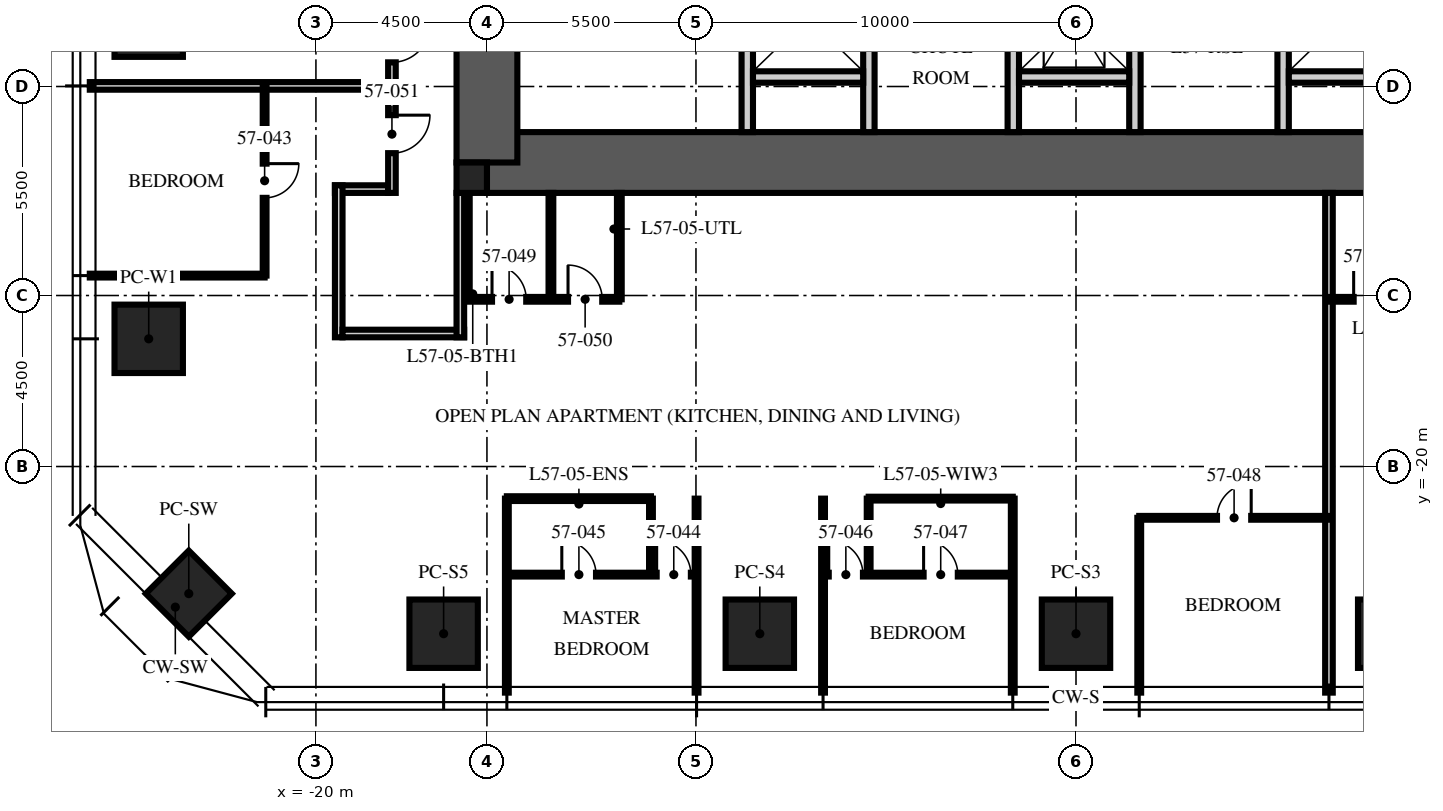
"""IFC4 building model, lengths in metres.
Left out: names, types, materials, properties, quantities, classifications, styles, units other than length and angle.
Written with IfcOpenShell. Run it as: python <this file> out.ifc"""

import sys

from ifc_helpers import new_model, si_unit, direction, frame, frame_2d, origin, origin_2d, place, context, subcontext, project, spatial, rectangle, extrude, element, fill, save


model = new_model("IFC4")
c1 = context("Model", 3, precision=1e-05, world=origin(), true_north=direction((0.0, 1.0)))
c2 = subcontext(c1, "Body", "Model", "MODEL_VIEW")
j1 = project(units=[si_unit("LENGTHUNIT", "METRE"), si_unit("PLANEANGLEUNIT", "RADIAN")], contexts=[c1])
p1 = place(None, origin())
s1 = spatial("IfcSite", under=j1, at=p1, CompositionType="ELEMENT")
p2 = place(p1, origin())
s2 = spatial("IfcBuilding", under=s1, at=p2, CompositionType="ELEMENT")
p3 = place(p2, frame((0.0, 0.0, 229.5)))
s3 = spatial("IfcBuildingStorey", under=s2, at=p3, CompositionType="ELEMENT", Elevation=229.5)
p4 = place(p3, frame((-15.5, -12.0, -0.25), z_axis=(0.0, 0.0, 1.0), x_axis=(1.0, 0.0, 0.0)))
e1 = element("IfcWall", 1, at=p4, inside=s3, PredefinedType="SHEAR", context=c2, shape_type="SweptSolid", body=[
    extrude(rectangle(XDim=31.0, YDim=1.6, at=frame_2d((15.5, 0.0))), origin(), (0.0, 0.0, 1.0), 3.75),
])
p5 = place(p3, frame((-15.5, -12.0, -0.25), z_axis=(0.0, 0.0, 1.0), x_axis=(0.0, 1.0, 0.0)))
e2 = element("IfcWall", 2, at=p5, inside=s3, PredefinedType="SHEAR", context=c2, shape_type="SweptSolid", body=[
    extrude(rectangle(XDim=24.0, YDim=1.6, at=frame_2d((12.0, 0.0))), origin(), (0.0, 0.0, 1.0), 3.75),
])
p6 = place(p5, frame((3.2, 0.0, 0.25)))
e3 = element("IfcOpeningElement", 3, at=p6, cuts=e2, PredefinedType="OPENING", context=c2, shape_type="SweptSolid", body=[
    extrude(rectangle(XDim=1.2, YDim=2.1, at=frame_2d((0.6, 1.05))), frame((0.0, 0.81, 0.0), z_axis=(0.0, -1.0, 0.0), x_axis=(1.0, 0.0, 0.0)), (0.0, 0.0, 1.0), 1.62),
])
p7 = place(p5, frame((19.3, 0.0, 0.25)))
e4 = element("IfcOpeningElement", 4, at=p7, cuts=e2, PredefinedType="OPENING", context=c2, shape_type="SweptSolid", body=[
    extrude(rectangle(XDim=1.8, YDim=2.1, at=frame_2d((0.9, 1.05))), frame((0.0, 0.81, 0.0), z_axis=(0.0, -1.0, 0.0), x_axis=(1.0, 0.0, 0.0)), (0.0, 0.0, 1.0), 1.62),
])
p8 = place(p3, frame((-15.9, -12.4, -0.25), z_axis=(0.0, 0.0, 1.0), x_axis=(1.0, 0.0, 0.0)))
e5 = element("IfcColumn", 5, at=p8, inside=s3, PredefinedType="COLUMN", context=c2, shape_type="SweptSolid", body=[
    extrude(rectangle(XDim=0.8, YDim=0.8, at=origin_2d()), origin(), (0.0, 0.0, 1.0), 3.75),
])
for number, where, z_axis, x_axis in (
    (6, (8.32, -24.4, 0.0), (0.0, 0.0, 1.0), (1.0, 0.0, 0.0)),
    (7, (0.0, -24.4, 0.0), (0.0, 0.0, 1.0), (1.0, 0.0, 0.0)),
    (8, (-8.32, -24.4, 0.0), (0.0, 0.0, 1.0), (1.0, 0.0, 0.0)),
    (9, (-16.64, -24.4, 0.0), (0.0, 0.0, 1.0), (1.0, 0.0, 0.0)),
    (10, (-24.4, -16.64, 0.0), (0.0, 0.0, 1.0), (0.0, 1.0, 0.0)),
    (11, (-24.4, -8.32, 0.0), (0.0, 0.0, 1.0), (0.0, 1.0, 0.0)),
):
    element("IfcColumn", number, at=place(p3, frame(where, z_axis=z_axis, x_axis=x_axis)), inside=s3, PredefinedType="COLUMN", context=c2, shape_type="SweptSolid", body=[
        extrude(rectangle(XDim=1.8, YDim=1.8, at=origin_2d()), origin(), (0.0, 0.0, 1.0), 3.75),
    ])
p9 = place(p3, frame((-23.346, -23.346, 0.0), z_axis=(0.0, 0.0, 1.0), x_axis=(0.707106781187, -0.707106781187, 0.0)))
e12 = element("IfcColumn", 12, at=p9, inside=s3, PredefinedType="COLUMN", context=c2, shape_type="SweptSolid", body=[
    extrude(rectangle(XDim=1.6, YDim=1.6, at=origin_2d()), origin(), (0.0, 0.0, 1.0), 3.75),
])
p10 = place(p3, frame((-8.65, -11.2, 0.0), z_axis=(0.0, 0.0, 1.0), x_axis=(0.0, 1.0, 0.0)))
e13 = element("IfcWall", 13, at=p10, inside=s3, PredefinedType="PARTITIONING", context=c2, shape_type="SweptSolid", body=[
    extrude(rectangle(XDim=6.3, YDim=0.3, at=frame_2d((3.15, 0.0))), origin(), (0.0, 0.0, 1.0), 3.5),
])
p11 = place(p10, frame((2.45, 0.0, 0.0)))
e14 = element("IfcOpeningElement", 14, at=p11, cuts=e13, PredefinedType="OPENING", context=c2, shape_type="SweptSolid", body=[
    extrude(rectangle(XDim=1.1, YDim=2.1, at=frame_2d((0.55, 1.05))), frame((0.0, 0.16, 0.0), z_axis=(0.0, -1.0, 0.0), x_axis=(1.0, 0.0, 0.0)), (0.0, 0.0, 1.0), 0.32),
])
for number, where, z_axis, x_axis in (
    (15, (-5.45, -11.2, 0.0), (0.0, 0.0, 1.0), (0.0, 1.0, 0.0)),
    (16, (-1.65, -11.2, 0.0), (0.0, 0.0, 1.0), (0.0, 1.0, 0.0)),
    (17, (1.55, -11.2, 0.0), (0.0, 0.0, 1.0), (0.0, 1.0, 0.0)),
    (18, (5.45, -11.2, 0.0), (0.0, 0.0, 1.0), (0.0, 1.0, 0.0)),
):
    element("IfcWall", number, at=place(p3, frame(where, z_axis=z_axis, x_axis=x_axis)), inside=s3, PredefinedType="PARTITIONING", context=c2, shape_type="SweptSolid", body=[
        extrude(rectangle(XDim=4.4, YDim=0.3, at=frame_2d((2.2, 0.0))), origin(), (0.0, 0.0, 1.0), 3.5),
    ])
for number, where, z_axis, x_axis in (
    (19, (-8.5, -9.75, 0.0), (0.0, 0.0, 1.0), (1.0, 0.0, 0.0)),
    (20, (-1.5, -9.75, 0.0), (0.0, 0.0, 1.0), (1.0, 0.0, 0.0)),
    (21, (5.6, -9.75, 0.0), (0.0, 0.0, 1.0), (1.0, 0.0, 0.0)),
):
    element("IfcWall", number, at=place(p3, frame(where, z_axis=z_axis, x_axis=x_axis)), inside=s3, PredefinedType="PARTITIONING", context=c2, shape_type="SweptSolid", body=[
        extrude(rectangle(XDim=2.9, YDim=0.3, at=frame_2d((1.45, 0.0))), origin(), (0.0, 0.0, 1.0), 3.5),
    ])
p12 = place(p3, frame((-18.1, -12.7, 0.0), z_axis=(0.0, 0.0, 1.0), x_axis=(-1.0, 0.0, 0.0)))
e22 = element("IfcWall", 22, at=p12, inside=s3, PredefinedType="PARTITIONING", context=c2, shape_type="SweptSolid", body=[
    extrude(rectangle(XDim=1.4, YDim=0.2, at=frame_2d((0.7, 0.0))), origin(), (0.0, 0.0, 1.0), 2.81),
])
p13 = place(p3, frame((-19.4, -12.6, 0.0), z_axis=(0.0, 0.0, 1.0), x_axis=(0.0, -1.0, 0.0)))
e23 = element("IfcWall", 23, at=p13, inside=s3, PredefinedType="PARTITIONING", context=c2, shape_type="SweptSolid", body=[
    extrude(rectangle(XDim=4.0, YDim=0.2, at=frame_2d((2.0, 0.0))), origin(), (0.0, 0.0, 1.0), 2.6),
])
p14 = place(p3, frame((-19.3, -16.5, 0.0), z_axis=(0.0, 0.0, 1.0), x_axis=(1.0, 0.0, 0.0)))
e24 = element("IfcWall", 24, at=p14, inside=s3, PredefinedType="PARTITIONING", context=c2, shape_type="SweptSolid", body=[
    extrude(rectangle(XDim=3.2, YDim=0.2, at=frame_2d((1.6, 0.0))), origin(), (0.0, 0.0, 1.0), 2.3),
])
p15 = place(p3, frame((-16.2, -16.6, 0.0), z_axis=(0.0, 0.0, 1.0), x_axis=(0.0, 1.0, 0.0)))
e25 = element("IfcWall", 25, at=p15, inside=s3, PredefinedType="PARTITIONING", context=c2, shape_type="SweptSolid", body=[
    extrude(rectangle(XDim=3.8, YDim=0.2, at=frame_2d((1.9, 0.0))), origin(), (0.0, 0.0, 1.0), 2.3),
])
p16 = place(p3, frame((-18.1, -9.984, 0.0), z_axis=(0.0, 0.0, 1.0), x_axis=(-1.0, 0.0, 0.0)))
e26 = element("IfcWall", 26, at=p16, inside=s3, PredefinedType="PARTITIONING", context=c2, shape_type="SweptSolid", body=[
    extrude(rectangle(XDim=7.85, YDim=0.2, at=frame_2d((3.925, 0.0))), origin(), (0.0, 0.0, 1.0), 2.91),
])
p17 = place(p3, frame((-21.35, -14.976, 0.0), z_axis=(0.0, 0.0, 1.0), x_axis=(-1.0, 0.0, 0.0)))
e27 = element("IfcWall", 27, at=p17, inside=s3, PredefinedType="PARTITIONING", context=c2, shape_type="SweptSolid", body=[
    extrude(rectangle(XDim=4.6, YDim=0.1, at=frame_2d((2.3, 0.0))), origin(), (0.0, 0.0, 1.0), 2.91),
])
for number, where, z_axis, x_axis in (
    (28, (-14.976, -20.845, 0.0), (0.0, 0.0, 1.0), (0.0, -1.0, 0.0)),
    (29, (-9.984, -20.845, 0.0), (0.0, 0.0, 1.0), (0.0, -1.0, 0.0)),
    (30, (-6.656, -20.845, 0.0), (0.0, 0.0, 1.0), (0.0, -1.0, 0.0)),
    (31, (-1.664, -20.845, 0.0), (0.0, 0.0, 1.0), (0.0, -1.0, 0.0)),
):
    element("IfcWall", number, at=place(p3, frame(where, z_axis=z_axis, x_axis=x_axis)), inside=s3, PredefinedType="PARTITIONING", context=c2, shape_type="SweptSolid", body=[
        extrude(rectangle(XDim=5.105, YDim=0.1, at=frame_2d((2.552, 0.0))), origin(), (0.0, 0.0, 1.0), 2.91),
    ])
p18 = place(p3, frame((1.664, -21.35, 0.0), z_axis=(0.0, 0.0, 1.0), x_axis=(0.0, -1.0, 0.0)))
e32 = element("IfcWall", 32, at=p18, inside=s3, PredefinedType="PARTITIONING", context=c2, shape_type="SweptSolid", body=[
    extrude(rectangle(XDim=4.6, YDim=0.1, at=frame_2d((2.3, 0.0))), origin(), (0.0, 0.0, 1.0), 2.91),
])
p19 = place(p3, frame((6.656, -12.8, 0.0), z_axis=(0.0, 0.0, 1.0), x_axis=(0.0, -1.0, 0.0)))
e33 = element("IfcWall", 33, at=p19, inside=s3, PredefinedType="PARTITIONING", context=c2, shape_type="SweptSolid", body=[
    extrude(rectangle(XDim=13.15, YDim=0.2, at=frame_2d((6.575, 0.0))), origin(), (0.0, 0.0, 1.0), 2.91),
])
p20 = place(p3, frame((-21.35, -9.984, 0.0), z_axis=(0.0, 0.0, 1.0), x_axis=(0.0, -1.0, 0.0)))
e34 = element("IfcWall", 34, at=p20, inside=s3, PredefinedType="PARTITIONING", context=c2, shape_type="SweptSolid", body=[
    extrude(rectangle(XDim=4.992, YDim=0.1, at=frame_2d((2.496, 0.0))), origin(), (0.0, 0.0, 1.0), 2.81),
])
p21 = place(p20, frame((2.046, 0.0, 0.0)))
e35 = element("IfcOpeningElement", 35, at=p21, cuts=e34, PredefinedType="OPENING", context=c2, shape_type="SweptSolid", body=[
    extrude(rectangle(XDim=0.9, YDim=2.1, at=frame_2d((0.45, 1.05))), frame((0.0, 0.06, 0.0), z_axis=(0.0, -1.0, 0.0), x_axis=(1.0, 0.0, 0.0)), (0.0, 0.0, 1.0), 0.12),
])
p22 = place(p3, frame((-14.976, -22.845, 0.0), z_axis=(0.0, 0.0, 1.0), x_axis=(1.0, 0.0, 0.0)))
e36 = element("IfcWall", 36, at=p22, inside=s3, PredefinedType="PARTITIONING", context=c2, shape_type="SweptSolid", body=[
    extrude(rectangle(XDim=4.992, YDim=0.1, at=frame_2d((2.496, 0.0))), origin(), (0.0, 0.0, 1.0), 2.81),
])
p23 = place(p22, frame((3.942, 0.0, 0.0)))
e37 = element("IfcOpeningElement", 37, at=p23, cuts=e36, PredefinedType="OPENING", context=c2, shape_type="SweptSolid", body=[
    extrude(rectangle(XDim=0.9, YDim=2.1, at=frame_2d((0.45, 1.05))), frame((0.0, 0.06, 0.0), z_axis=(0.0, -1.0, 0.0), x_axis=(1.0, 0.0, 0.0)), (0.0, 0.0, 1.0), 0.12),
])
p24 = place(p22, frame((1.446, 0.0, 0.0)))
e38 = element("IfcOpeningElement", 38, at=p24, cuts=e36, PredefinedType="OPENING", context=c2, shape_type="SweptSolid", body=[
    extrude(rectangle(XDim=0.9, YDim=2.1, at=frame_2d((0.45, 1.05))), frame((0.0, 0.06, 0.0), z_axis=(0.0, -1.0, 0.0), x_axis=(1.0, 0.0, 0.0)), (0.0, 0.0, 1.0), 0.12),
])
p25 = place(p3, frame((-11.184, -20.845, 0.0), z_axis=(0.0, 0.0, 1.0), x_axis=(0.0, -1.0, 0.0)))
e39 = element("IfcWall", 39, at=p25, inside=s3, PredefinedType="PARTITIONING", context=c2, shape_type="SweptSolid", body=[
    extrude(rectangle(XDim=2.0, YDim=0.1, at=frame_2d((1.0, 0.0))), origin(), (0.0, 0.0, 1.0), 3.5),
])
p26 = place(p3, frame((-14.976, -20.845, 0.0), z_axis=(0.0, 0.0, 1.0), x_axis=(1.0, 0.0, 0.0)))
e40 = element("IfcWall", 40, at=p26, inside=s3, PredefinedType="PARTITIONING", context=c2, shape_type="SweptSolid", body=[
    extrude(rectangle(XDim=3.792, YDim=0.125, at=frame_2d((1.896, 0.0))), origin(), (0.0, 0.0, 1.0), 2.81),
])
p27 = place(p3, frame((-6.656, -22.845, 0.0), z_axis=(0.0, 0.0, 1.0), x_axis=(1.0, 0.0, 0.0)))
e41 = element("IfcWall", 41, at=p27, inside=s3, PredefinedType="PARTITIONING", context=c2, shape_type="SweptSolid", body=[
    extrude(rectangle(XDim=4.992, YDim=0.1, at=frame_2d((2.496, 0.0))), origin(), (0.0, 0.0, 1.0), 2.81),
])
p28 = place(p27, frame((0.15, 0.0, 0.0)))
e42 = element("IfcOpeningElement", 42, at=p28, cuts=e41, PredefinedType="OPENING", context=c2, shape_type="SweptSolid", body=[
    extrude(rectangle(XDim=0.9, YDim=2.1, at=frame_2d((0.45, 1.05))), frame((0.0, 0.06, 0.0), z_axis=(0.0, -1.0, 0.0), x_axis=(1.0, 0.0, 0.0)), (0.0, 0.0, 1.0), 0.12),
])
p29 = place(p27, frame((2.646, 0.0, 0.0)))
e43 = element("IfcOpeningElement", 43, at=p29, cuts=e41, PredefinedType="OPENING", context=c2, shape_type="SweptSolid", body=[
    extrude(rectangle(XDim=0.9, YDim=2.1, at=frame_2d((0.45, 1.05))), frame((0.0, 0.06, 0.0), z_axis=(0.0, -1.0, 0.0), x_axis=(1.0, 0.0, 0.0)), (0.0, 0.0, 1.0), 0.12),
])
p30 = place(p3, frame((-5.456, -20.845, 0.0), z_axis=(0.0, 0.0, 1.0), x_axis=(0.0, -1.0, 0.0)))
e44 = element("IfcWall", 44, at=p30, inside=s3, PredefinedType="PARTITIONING", context=c2, shape_type="SweptSolid", body=[
    extrude(rectangle(XDim=2.0, YDim=0.1, at=frame_2d((1.0, 0.0))), origin(), (0.0, 0.0, 1.0), 3.5),
])
p31 = place(p3, frame((-5.456, -20.845, 0.0), z_axis=(0.0, 0.0, 1.0), x_axis=(1.0, 0.0, 0.0)))
e45 = element("IfcWall", 45, at=p31, inside=s3, PredefinedType="PARTITIONING", context=c2, shape_type="SweptSolid", body=[
    extrude(rectangle(XDim=3.792, YDim=0.1, at=frame_2d((1.896, 0.0))), origin(), (0.0, 0.0, 1.0), 2.81),
])
p32 = place(p3, frame((1.664, -21.35, 0.0), z_axis=(0.0, 0.0, 1.0), x_axis=(1.0, 0.0, 0.0)))
e46 = element("IfcWall", 46, at=p32, inside=s3, PredefinedType="PARTITIONING", context=c2, shape_type="SweptSolid", body=[
    extrude(rectangle(XDim=4.992, YDim=0.1, at=frame_2d((2.496, 0.0))), origin(), (0.0, 0.0, 1.0), 2.81),
])
p33 = place(p32, frame((2.046, 0.0, 0.0)))
e47 = element("IfcOpeningElement", 47, at=p33, cuts=e46, PredefinedType="OPENING", context=c2, shape_type="SweptSolid", body=[
    extrude(rectangle(XDim=0.9, YDim=2.1, at=frame_2d((0.45, 1.05))), frame((0.0, 0.06, 0.0), z_axis=(0.0, -1.0, 0.0), x_axis=(1.0, 0.0, 0.0)), (0.0, 0.0, 1.0), 0.12),
])
p34 = place(p3, frame((-16.017, -15.6, 0.0), z_axis=(0.0, 0.0, 1.0), x_axis=(1.0, 0.0, 0.0)))
e48 = element("IfcWall", 48, at=p34, inside=s3, PredefinedType="PARTITIONING", context=c2, shape_type="SweptSolid", body=[
    extrude(rectangle(XDim=4.0, YDim=0.125, at=frame_2d((2.0, 0.0))), origin(), (0.0, 0.0, 1.0), 2.81),
])
p35 = place(p34, frame((0.65, 0.0, 0.0)))
e49 = element("IfcOpeningElement", 49, at=p35, cuts=e48, PredefinedType="OPENING", context=c2, shape_type="SweptSolid", body=[
    extrude(rectangle(XDim=0.9, YDim=2.1, at=frame_2d((0.45, 1.05))), frame((0.0, 0.073, 0.0), z_axis=(0.0, -1.0, 0.0), x_axis=(1.0, 0.0, 0.0)), (0.0, 0.0, 1.0), 0.145),
])
p36 = place(p34, frame((2.65, 0.0, 0.0)))
e50 = element("IfcOpeningElement", 50, at=p36, cuts=e48, PredefinedType="OPENING", context=c2, shape_type="SweptSolid", body=[
    extrude(rectangle(XDim=0.9, YDim=2.1, at=frame_2d((0.45, 1.05))), frame((0.0, 0.073, 0.0), z_axis=(0.0, -1.0, 0.0), x_axis=(1.0, 0.0, 0.0)), (0.0, 0.0, 1.0), 0.145),
])
p37 = place(p3, frame((-16.017, -12.8, 0.0), z_axis=(0.0, 0.0, 1.0), x_axis=(0.0, -1.0, 0.0)))
e51 = element("IfcWall", 51, at=p37, inside=s3, PredefinedType="PARTITIONING", context=c2, shape_type="SweptSolid", body=[
    extrude(rectangle(XDim=2.8, YDim=0.125, at=frame_2d((1.4, 0.0))), origin(), (0.0, 0.0, 1.0), 2.3),
])
for number, where, z_axis, x_axis in (
    (52, (-13.816, -12.8, 0.0), (0.0, 0.0, 1.0), (0.0, -1.0, 0.0)),
    (53, (-12.017, -12.8, 0.0), (0.0, 0.0, 1.0), (0.0, -1.0, 0.0)),
):
    element("IfcWall", number, at=place(p3, frame(where, z_axis=z_axis, x_axis=x_axis)), inside=s3, PredefinedType="PARTITIONING", context=c2, shape_type="SweptSolid", body=[
        extrude(rectangle(XDim=2.8, YDim=0.125, at=frame_2d((1.4, 0.0))), origin(), (0.0, 0.0, 1.0), 3.5),
    ])
p38 = place(p3, frame((6.656, -15.6, 0.0), z_axis=(0.0, 0.0, 1.0), x_axis=(1.0, 0.0, 0.0)))
e54 = element("IfcWall", 54, at=p38, inside=s3, PredefinedType="PARTITIONING", context=c2, shape_type="SweptSolid", body=[
    extrude(rectangle(XDim=2.2, YDim=0.125, at=frame_2d((1.1, 0.0))), origin(), (0.0, 0.0, 1.0), 2.6),
])
p39 = place(p38, frame((0.65, 0.0, 0.0)))
e55 = element("IfcOpeningElement", 55, at=p39, cuts=e54, PredefinedType="OPENING", context=c2, shape_type="SweptSolid", body=[
    extrude(rectangle(XDim=0.9, YDim=2.1, at=frame_2d((0.45, 1.05))), frame((0.0, 0.073, 0.0), z_axis=(0.0, -1.0, 0.0), x_axis=(1.0, 0.0, 0.0)), (0.0, 0.0, 1.0), 0.145),
])
p40 = place(p3, frame((-18.0, 13.0, 0.0), z_axis=(0.0, 0.0, 1.0), x_axis=(0.0, -1.0, 0.0)))
e56 = element("IfcWall", 56, at=p40, inside=s3, PredefinedType="PARTITIONING", context=c2, shape_type="SweptSolid", body=[
    extrude(rectangle(XDim=25.8, YDim=0.2, at=frame_2d((12.9, 0.0))), origin(), (0.0, 0.0, 1.0), 2.6),
])
p41 = place(p40, frame((4.6, 0.0, 0.0)))
e57 = element("IfcOpeningElement", 57, at=p41, cuts=e56, PredefinedType="OPENING", context=c2, shape_type="SweptSolid", body=[
    extrude(rectangle(XDim=1.0, YDim=2.2, at=frame_2d((0.5, 1.1))), frame((0.0, 0.11, 0.0), z_axis=(0.0, -1.0, 0.0), x_axis=(1.0, 0.0, 0.0)), (0.0, 0.0, 1.0), 0.22),
])
p42 = place(p40, frame((21.364, 0.0, 0.0)))
e58 = element("IfcOpeningElement", 58, at=p42, cuts=e56, PredefinedType="OPENING", context=c2, shape_type="SweptSolid", body=[
    extrude(rectangle(XDim=1.0, YDim=2.2, at=frame_2d((0.5, 1.1))), frame((0.0, 0.11, 0.0), z_axis=(0.0, -1.0, 0.0), x_axis=(1.0, 0.0, 0.0)), (0.0, 0.0, 1.0), 0.22),
])
p43 = place(p40, frame((23.754, 0.0, 0.0)))
e59 = element("IfcOpeningElement", 59, at=p43, cuts=e56, PredefinedType="OPENING", context=c2, shape_type="SweptSolid", body=[
    extrude(rectangle(XDim=1.0, YDim=2.2, at=frame_2d((0.5, 1.1))), frame((0.0, 0.11, 0.0), z_axis=(0.0, -1.0, 0.0), x_axis=(1.0, 0.0, 0.0)), (0.0, 0.0, 1.0), 0.22),
])
p44 = place(p42, origin())
e60 = element("IfcDoor", 60, at=p44, inside=s3, OperationType="SINGLE_SWING_LEFT", PredefinedType="DOOR", context=c2, shape_type="SweptSolid", body=[
    extrude(rectangle(XDim=1.0, YDim=2.2, at=frame_2d((0.5, 1.1))), frame((0.0, 0.025, 0.0), z_axis=(0.0, -1.0, 0.0), x_axis=(1.0, 0.0, 0.0)), (0.0, 0.0, 1.0), 0.05),
])
fill(e58, e60)
p45 = place(p21, origin())
e61 = element("IfcDoor", 61, at=p45, inside=s3, OperationType="SINGLE_SWING_LEFT", PredefinedType="DOOR", context=c2, shape_type="SweptSolid", body=[
    extrude(rectangle(XDim=0.9, YDim=2.1, at=frame_2d((0.45, 1.05))), frame((0.0, 0.025, 0.0), z_axis=(0.0, -1.0, 0.0), x_axis=(1.0, 0.0, 0.0)), (0.0, 0.0, 1.0), 0.05),
])
fill(e35, e61)
p46 = place(p23, origin())
e62 = element("IfcDoor", 62, at=p46, inside=s3, OperationType="SINGLE_SWING_LEFT", PredefinedType="DOOR", context=c2, shape_type="SweptSolid", body=[
    extrude(rectangle(XDim=0.9, YDim=2.1, at=frame_2d((0.45, 1.05))), frame((0.0, 0.025, 0.0), z_axis=(0.0, -1.0, 0.0), x_axis=(1.0, 0.0, 0.0)), (0.0, 0.0, 1.0), 0.05),
])
fill(e37, e62)
p47 = place(p24, origin())
e63 = element("IfcDoor", 63, at=p47, inside=s3, OperationType="SINGLE_SWING_LEFT", PredefinedType="DOOR", context=c2, shape_type="SweptSolid", body=[
    extrude(rectangle(XDim=0.9, YDim=2.1, at=frame_2d((0.45, 1.05))), frame((0.0, 0.025, 0.0), z_axis=(0.0, -1.0, 0.0), x_axis=(1.0, 0.0, 0.0)), (0.0, 0.0, 1.0), 0.05),
])
fill(e38, e63)
p48 = place(p28, origin())
e64 = element("IfcDoor", 64, at=p48, inside=s3, OperationType="SINGLE_SWING_LEFT", PredefinedType="DOOR", context=c2, shape_type="SweptSolid", body=[
    extrude(rectangle(XDim=0.9, YDim=2.1, at=frame_2d((0.45, 1.05))), frame((0.0, 0.025, 0.0), z_axis=(0.0, -1.0, 0.0), x_axis=(1.0, 0.0, 0.0)), (0.0, 0.0, 1.0), 0.05),
])
fill(e42, e64)
p49 = place(p29, origin())
e65 = element("IfcDoor", 65, at=p49, inside=s3, OperationType="SINGLE_SWING_LEFT", PredefinedType="DOOR", context=c2, shape_type="SweptSolid", body=[
    extrude(rectangle(XDim=0.9, YDim=2.1, at=frame_2d((0.45, 1.05))), frame((0.0, 0.025, 0.0), z_axis=(0.0, -1.0, 0.0), x_axis=(1.0, 0.0, 0.0)), (0.0, 0.0, 1.0), 0.05),
])
fill(e43, e65)
p50 = place(p33, origin())
e66 = element("IfcDoor", 66, at=p50, inside=s3, OperationType="SINGLE_SWING_RIGHT", PredefinedType="DOOR", context=c2, shape_type="SweptSolid", body=[
    extrude(rectangle(XDim=0.9, YDim=2.1, at=frame_2d((0.45, 1.05))), frame((0.0, 0.025, 0.0), z_axis=(0.0, -1.0, 0.0), x_axis=(1.0, 0.0, 0.0)), (0.0, 0.0, 1.0), 0.05),
])
fill(e47, e66)
p51 = place(p35, origin())
e67 = element("IfcDoor", 67, at=p51, inside=s3, OperationType="SINGLE_SWING_LEFT", PredefinedType="DOOR", context=c2, shape_type="SweptSolid", body=[
    extrude(rectangle(XDim=0.9, YDim=2.1, at=frame_2d((0.45, 1.05))), frame((0.0, 0.025, 0.0), z_axis=(0.0, -1.0, 0.0), x_axis=(1.0, 0.0, 0.0)), (0.0, 0.0, 1.0), 0.05),
])
fill(e49, e67)
p52 = place(p36, origin())
e68 = element("IfcDoor", 68, at=p52, inside=s3, OperationType="SINGLE_SWING_LEFT", PredefinedType="DOOR", context=c2, shape_type="SweptSolid", body=[
    extrude(rectangle(XDim=0.9, YDim=2.1, at=frame_2d((0.45, 1.05))), frame((0.0, 0.025, 0.0), z_axis=(0.0, -1.0, 0.0), x_axis=(1.0, 0.0, 0.0)), (0.0, 0.0, 1.0), 0.05),
])
fill(e50, e68)
p53 = place(p43, origin())
e69 = element("IfcDoor", 69, at=p53, inside=s3, OperationType="SINGLE_SWING_LEFT", PredefinedType="DOOR", context=c2, shape_type="SweptSolid", body=[
    extrude(rectangle(XDim=1.0, YDim=2.2, at=frame_2d((0.5, 1.1))), frame((0.0, 0.025, 0.0), z_axis=(0.0, -1.0, 0.0), x_axis=(1.0, 0.0, 0.0)), (0.0, 0.0, 1.0), 0.05),
])
fill(e59, e69)
p54 = place(p39, origin())
e70 = element("IfcDoor", 70, at=p54, inside=s3, OperationType="SINGLE_SWING_LEFT", PredefinedType="DOOR", context=c2, shape_type="SweptSolid", body=[
    extrude(rectangle(XDim=0.9, YDim=2.1, at=frame_2d((0.45, 1.05))), frame((0.0, 0.025, 0.0), z_axis=(0.0, -1.0, 0.0), x_axis=(1.0, 0.0, 0.0)), (0.0, 0.0, 1.0), 0.05),
])
fill(e55, e70)
save(model, sys.argv[1])
